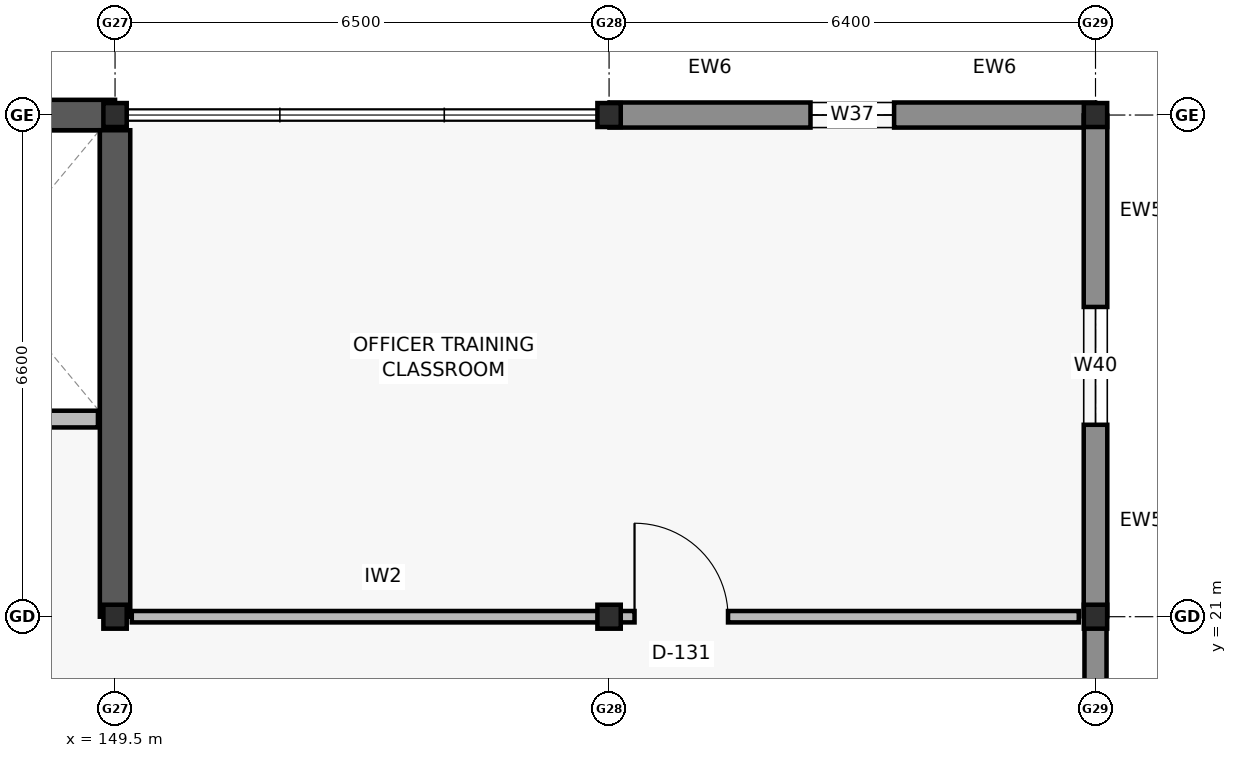
"""IFC4 building model, lengths in metres.
Left out: names, types, materials, properties, quantities, classifications, styles, units other than length and angle.
Written with IfcOpenShell. Run it as: python <this file> out.ifc"""

import sys

from ifc_helpers import new_model, si_unit, direction, frame, frame_2d, origin, origin_2d, place, context, subcontext, project, spatial, rectangle, i_section, extrude, element, fill, save


model = new_model("IFC4")
c1 = context("Model", 3, precision=1e-05, world=origin(), true_north=direction((0.0, 1.0)))
c2 = subcontext(c1, "Body", "Model", "MODEL_VIEW")
j1 = project(units=[si_unit("LENGTHUNIT", "METRE"), si_unit("PLANEANGLEUNIT", "RADIAN")], contexts=[c1])
p1 = place(None, origin())
s1 = spatial("IfcSite", under=j1, at=p1, CompositionType="ELEMENT")
p2 = place(p1, origin())
s2 = spatial("IfcBuilding", under=s1, at=p2, CompositionType="ELEMENT")
p3 = place(p2, frame((0.0, 0.0, 13.5)))
s3 = spatial("IfcBuildingStorey", under=s2, at=p3, CompositionType="ELEMENT", Elevation=13.5)
for number, where, z_axis, x_axis in (
    (1, (149.5, 21.0, 0.0), (0.0, 0.0, 1.0), (1.0, 0.0, 0.0)),
    (2, (149.5, 27.6, 0.0), (0.0, 0.0, 1.0), (1.0, 0.0, 0.0)),
    (3, (156.0, 21.0, 0.0), (0.0, 0.0, 1.0), (1.0, 0.0, 0.0)),
    (4, (156.0, 27.6, 0.0), (0.0, 0.0, 1.0), (1.0, 0.0, 0.0)),
    (5, (162.4, 21.0, 0.0), (0.0, 0.0, 1.0), (1.0, 0.0, 0.0)),
    (6, (162.4, 27.6, 0.0), (0.0, 0.0, 1.0), (1.0, 0.0, 0.0)),
):
    element("IfcColumn", number, at=place(p3, frame(where, z_axis=z_axis, x_axis=x_axis)), inside=s3, PredefinedType="COLUMN", context=c2, shape_type="SweptSolid", body=[
        extrude(i_section(OverallWidth=0.307, OverallDepth=0.315, WebThickness=0.012, FlangeThickness=0.019, FilletRadius=0.017, at=origin_2d()), origin(), (0.0, 0.0, 1.0), 3.9),
    ])
p4 = place(p3, frame((143.0, 27.6, 0.0), z_axis=(0.0, 0.0, 1.0), x_axis=(1.0, 0.0, 0.0)))
e7 = element("IfcWall", 7, at=p4, inside=s3, PredefinedType="SHEAR", context=c2, shape_type="SweptSolid", body=[
    extrude(rectangle(XDim=6.5, YDim=0.4, at=frame_2d((3.25, 0.0))), origin(), (0.0, 0.0, 1.0), 3.66),
])
p5 = place(p3, frame((149.5, 21.0, 0.0), z_axis=(0.0, 0.0, 1.0), x_axis=(0.0, 1.0, 0.0)))
e8 = element("IfcWall", 8, at=p5, inside=s3, PredefinedType="SHEAR", context=c2, shape_type="SweptSolid", body=[
    extrude(rectangle(XDim=6.4, YDim=0.4, at=frame_2d((3.2, 0.0))), origin(), (0.0, 0.0, 1.0), 3.66),
])
p6 = place(p3, frame((156.005, 27.6, 0.0), z_axis=(0.0, 0.0, 1.0), x_axis=(1.0, 0.0, 0.0)))
e9 = element("IfcWall", 9, at=p6, inside=s3, PredefinedType="SOLIDWALL", context=c2, shape_type="SweptSolid", body=[
    extrude(rectangle(XDim=6.39, YDim=0.33, at=frame_2d((3.195, 0.0))), origin(), (0.0, 0.0, 1.0), 3.02),
])
p7 = place(p6, frame((2.645, 0.0, 0.8)))
e10 = element("IfcOpeningElement", 10, at=p7, cuts=e9, PredefinedType="OPENING", context=c2, shape_type="SweptSolid", body=[
    extrude(rectangle(XDim=1.1, YDim=1.65, at=frame_2d((0.55, 0.825))), frame((0.0, 0.175, 0.0), z_axis=(0.0, -1.0, 0.0), x_axis=(1.0, 0.0, 0.0)), (0.0, 0.0, 1.0), 0.35),
])
p8 = place(p3, frame((162.4, 20.995, 0.0), z_axis=(0.0, 0.0, 1.0), x_axis=(0.0, -1.0, 0.0)))
e11 = element("IfcWall", 11, at=p8, inside=s3, PredefinedType="SOLIDWALL", context=c2, shape_type="SweptSolid", body=[
    extrude(rectangle(XDim=6.59, YDim=0.29, at=frame_2d((3.295, 0.0))), origin(), (0.0, 0.0, 1.0), 3.02),
])
p9 = place(p8, frame((3.978, 0.0, 0.8)))
e12 = element("IfcOpeningElement", 12, at=p9, cuts=e11, PredefinedType="OPENING", context=c2, shape_type="SweptSolid", body=[
    extrude(rectangle(XDim=1.4, YDim=1.65, at=frame_2d((0.7, 0.825))), frame((0.0, 0.155, 0.0), z_axis=(0.0, -1.0, 0.0), x_axis=(1.0, 0.0, 0.0)), (0.0, 0.0, 1.0), 0.31),
])
p10 = place(p3, frame((162.4, 27.595, 0.0), z_axis=(0.0, 0.0, 1.0), x_axis=(0.0, -1.0, 0.0)))
e13 = element("IfcWall", 13, at=p10, inside=s3, PredefinedType="SOLIDWALL", context=c2, shape_type="SweptSolid", body=[
    extrude(rectangle(XDim=6.59, YDim=0.31, at=frame_2d((3.295, 0.0))), origin(), (0.0, 0.0, 1.0), 3.02),
])
p11 = place(p10, frame((2.52, 0.0, 0.8)))
e14 = element("IfcOpeningElement", 14, at=p11, cuts=e13, PredefinedType="OPENING", context=c2, shape_type="SweptSolid", body=[
    extrude(rectangle(XDim=1.55, YDim=1.65, at=frame_2d((0.775, 0.825))), frame((0.0, 0.165, 0.0), z_axis=(0.0, -1.0, 0.0), x_axis=(1.0, 0.0, 0.0)), (0.0, 0.0, 1.0), 0.33),
])
p12 = place(p3, frame((146.24, 23.6, 0.0), z_axis=(0.0, 0.0, 1.0), x_axis=(1.0, 0.0, 0.0)))
e15 = element("IfcWall", 15, at=p12, inside=s3, PredefinedType="SOLIDWALL", context=c2, shape_type="SweptSolid", body=[
    extrude(rectangle(XDim=3.035, YDim=0.22, at=frame_2d((1.518, 0.0))), origin(), (0.0, 0.0, 1.0), 3.66),
])
p13 = place(p12, frame((0.968, 0.0, 0.0)))
e16 = element("IfcOpeningElement", 16, at=p13, cuts=e15, PredefinedType="OPENING", context=c2, shape_type="SweptSolid", body=[
    extrude(rectangle(XDim=1.1, YDim=2.1, at=frame_2d((0.55, 1.05))), frame((0.0, 0.12, 0.0), z_axis=(0.0, -1.0, 0.0), x_axis=(1.0, 0.0, 0.0)), (0.0, 0.0, 1.0), 0.24),
])
p14 = place(p3, frame((149.72, 21.0, 0.0), z_axis=(0.0, 0.0, 1.0), x_axis=(1.0, 0.0, 0.0)))
e17 = element("IfcWall", 17, at=p14, inside=s3, PredefinedType="PARTITIONING", context=c2, shape_type="SweptSolid", body=[
    extrude(rectangle(XDim=12.46, YDim=0.15, at=frame_2d((6.23, 0.0))), origin(), (0.0, 0.0, 1.0), 3.0),
])
p15 = place(p14, frame((6.615, 0.0, 0.0)))
e18 = element("IfcOpeningElement", 18, at=p15, cuts=e17, PredefinedType="OPENING", context=c2, shape_type="SweptSolid", body=[
    extrude(rectangle(XDim=1.23, YDim=2.08, at=frame_2d((0.615, 1.04))), frame((0.0, 0.085, 0.0), z_axis=(0.0, -1.0, 0.0), x_axis=(1.0, 0.0, 0.0)), (0.0, 0.0, 1.0), 0.17),
])
p16 = place(p7, origin())
e19 = element("IfcWindow", 19, at=p16, inside=s3, PartitioningType="SINGLE_PANEL", PredefinedType="WINDOW", context=c2, shape_type="SweptSolid", body=[
    extrude(rectangle(XDim=1.1, YDim=1.65, at=frame_2d((0.55, 0.825))), frame((0.0, 0.03, 0.0), z_axis=(0.0, -1.0, 0.0), x_axis=(1.0, 0.0, 0.0)), (0.0, 0.0, 1.0), 0.06),
])
fill(e10, e19)
p17 = place(p11, origin())
e20 = element("IfcWindow", 20, at=p17, inside=s3, PartitioningType="SINGLE_PANEL", PredefinedType="WINDOW", context=c2, shape_type="SweptSolid", body=[
    extrude(rectangle(XDim=1.55, YDim=1.65, at=frame_2d((0.775, 0.825))), frame((0.0, 0.03, 0.0), z_axis=(0.0, -1.0, 0.0), x_axis=(1.0, 0.0, 0.0)), (0.0, 0.0, 1.0), 0.06),
])
fill(e14, e20)
p18 = place(p15, origin())
e21 = element("IfcDoor", 21, at=p18, inside=s3, OperationType="SINGLE_SWING_LEFT", PredefinedType="DOOR", context=c2, shape_type="SweptSolid", body=[
    extrude(rectangle(XDim=1.23, YDim=2.08, at=frame_2d((0.615, 1.04))), frame((0.0, 0.025, 0.0), z_axis=(0.0, -1.0, 0.0), x_axis=(1.0, 0.0, 0.0)), (0.0, 0.0, 1.0), 0.05),
])
fill(e18, e21)
save(model, sys.argv[1])
